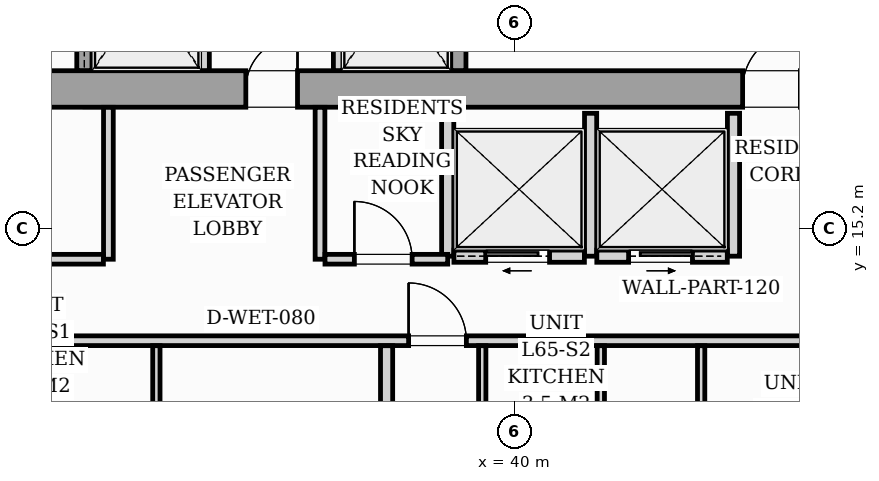
"""IFC4 building model, lengths in metres.
Left out: names, types, materials, properties, quantities, classifications, styles, units other than length and angle.
Written with IfcOpenShell. Run it as: python <this file> out.ifc"""

import sys

from ifc_helpers import new_model, si_unit, direction, frame, frame_2d, origin, origin_2d, place, context, subcontext, project, spatial, rectangle, i_section, extrude, source, transform, mapped, element, fill, save


model = new_model("IFC4")
c1 = context("Model", 3, precision=1e-05, world=origin(), true_north=direction((0.0, 1.0)))
c2 = subcontext(c1, "Body", "Model", "MODEL_VIEW")
j1 = project(units=[si_unit("LENGTHUNIT", "METRE"), si_unit("PLANEANGLEUNIT", "RADIAN")], contexts=[c1])
p1 = place(None, origin())
s1 = spatial("IfcSite", under=j1, at=p1, CompositionType="ELEMENT")
p2 = place(p1, origin())
s2 = spatial("IfcBuilding", under=s1, at=p2, CompositionType="ELEMENT")
p3 = place(p2, frame((0.0, 0.0, 226.5)))
s3 = spatial("IfcBuildingStorey", under=s2, at=p3, CompositionType="ELEMENT", Elevation=226.5)
m1 = source(origin(), c2, "Body", "SweptSolid", [
    extrude(i_section(OverallWidth=0.409, OverallDepth=0.425, WebThickness=0.033, FlangeThickness=0.052, FilletRadius=0.018, at=origin_2d()), origin(), (0.0, 0.0, 1.0), 3.296),
])
for number, where, z_axis, x_axis in (
    (1, (33.12, 17.4, 0.002), (0.0, 0.0, 1.0), (1.0, 0.0, 0.0)),
    (2, (38.88, 17.4, 0.002), (0.0, 0.0, 1.0), (1.0, 0.0, 0.0)),
):
    element("IfcColumn", number, at=place(p3, frame(where, z_axis=z_axis, x_axis=x_axis)), inside=s3, PredefinedType="PILASTER", context=c2, shape_type="MappedRepresentation", body=[
        mapped(m1, transform((0.0, 0.0, 0.0), scale=1.0)),
    ])
p4 = place(p3, frame((26.2, 17.5, 0.0), z_axis=(0.0, 0.0, 1.0), x_axis=(1.0, 0.0, 0.0)))
e3 = element("IfcWall", 3, at=p4, inside=s3, PredefinedType="SHEAR", context=c2, shape_type="SweptSolid", body=[
    extrude(rectangle(XDim=19.6, YDim=0.6, at=frame_2d((9.8, 0.0))), origin(), (0.0, 0.0, 1.0), 3.3),
])
p5 = place(p4, frame((0.95, 0.0, 0.0)))
e4 = element("IfcOpeningElement", 4, at=p5, cuts=e3, PredefinedType="OPENING", context=c2, shape_type="SweptSolid", body=[
    extrude(rectangle(XDim=0.95, YDim=2.06, at=frame_2d((0.475, 1.03))), frame((0.0, 0.31, 0.0), z_axis=(0.0, -1.0, 0.0), x_axis=(1.0, 0.0, 0.0)), (0.0, 0.0, 1.0), 0.62),
])
p6 = place(p4, frame((9.38, 0.0, 0.0)))
e5 = element("IfcOpeningElement", 5, at=p6, cuts=e3, PredefinedType="OPENING", context=c2, shape_type="SweptSolid", body=[
    extrude(rectangle(XDim=0.85, YDim=2.0, at=frame_2d((0.425, 1.0))), frame((0.0, 0.31, 0.0), z_axis=(0.0, -1.0, 0.0), x_axis=(1.0, 0.0, 0.0)), (0.0, 0.0, 1.0), 0.62),
])
p7 = place(p4, frame((17.55, 0.0, 0.0)))
e6 = element("IfcOpeningElement", 6, at=p7, cuts=e3, PredefinedType="OPENING", context=c2, shape_type="SweptSolid", body=[
    extrude(rectangle(XDim=0.95, YDim=2.06, at=frame_2d((0.475, 1.03))), frame((0.0, 0.31, 0.0), z_axis=(0.0, -1.0, 0.0), x_axis=(1.0, 0.0, 0.0)), (0.0, 0.0, 1.0), 0.62),
])
p8 = place(p3, frame((32.925, 17.802, 0.0), z_axis=(0.0, 0.0, 1.0), x_axis=(0.0, 1.0, 0.0)))
e7 = element("IfcWall", 7, at=p8, inside=s3, PredefinedType="SOLIDWALL", context=c2, shape_type="SweptSolid", body=[
    extrude(rectangle(XDim=2.646, YDim=0.25, at=frame_2d((1.323, 0.0))), origin(), (0.0, 0.0, 1.0), 3.3),
])
p9 = place(p8, frame((0.548, 0.0, 0.0)))
e8 = element("IfcOpeningElement", 8, at=p9, cuts=e7, PredefinedType="OPENING", context=c2, shape_type="SweptSolid", body=[
    extrude(rectangle(XDim=1.1, YDim=2.08, at=frame_2d((0.55, 1.04))), frame((0.0, 0.135, 0.0), z_axis=(0.0, -1.0, 0.0), x_axis=(1.0, 0.0, 0.0)), (0.0, 0.0, 1.0), 0.27),
])
for number, where, z_axis, x_axis in (
    (9, (34.9, 17.802, 0.0), (0.0, 0.0, 1.0), (0.0, 1.0, 0.0)),
    (10, (37.1, 17.802, 0.0), (0.0, 0.0, 1.0), (0.0, 1.0, 0.0)),
):
    element("IfcWall", number, at=place(p3, frame(where, z_axis=z_axis, x_axis=x_axis)), inside=s3, PredefinedType="PARTITIONING", context=c2, shape_type="SweptSolid", body=[
        extrude(rectangle(XDim=2.646, YDim=0.16, at=frame_2d((1.323, 0.0))), origin(), (0.0, 0.0, 1.0), 3.04),
    ])
p10 = place(p3, frame((39.075, 17.802, 0.0), z_axis=(0.0, 0.0, 1.0), x_axis=(0.0, 1.0, 0.0)))
e11 = element("IfcWall", 11, at=p10, inside=s3, PredefinedType="SOLIDWALL", context=c2, shape_type="SweptSolid", body=[
    extrude(rectangle(XDim=2.646, YDim=0.25, at=frame_2d((1.323, 0.0))), origin(), (0.0, 0.0, 1.0), 3.3),
])
p11 = place(p10, frame((0.548, 0.0, 0.0)))
e12 = element("IfcOpeningElement", 12, at=p11, cuts=e11, PredefinedType="OPENING", context=c2, shape_type="SweptSolid", body=[
    extrude(rectangle(XDim=1.1, YDim=2.08, at=frame_2d((0.55, 1.04))), frame((0.0, 0.135, 0.0), z_axis=(0.0, -1.0, 0.0), x_axis=(1.0, 0.0, 0.0)), (0.0, 0.0, 1.0), 0.27),
])
for number, where, z_axis, x_axis in (
    (13, (38.9, 14.75, 0.0), (0.0, 0.0, 1.0), (0.0, 1.0, 0.0)),
    (14, (41.25, 14.75, 0.0), (0.0, 0.0, 1.0), (0.0, 1.0, 0.0)),
    (15, (43.6, 14.75, 0.0), (0.0, 0.0, 1.0), (0.0, 1.0, 0.0)),
):
    element("IfcWall", number, at=place(p3, frame(where, z_axis=z_axis, x_axis=x_axis)), inside=s3, PredefinedType="PARTITIONING", context=c2, shape_type="SweptSolid", body=[
        extrude(rectangle(XDim=2.35, YDim=0.2, at=frame_2d((1.175, 0.0))), origin(), (0.0, 0.0, 1.0), 3.04),
    ])
p12 = place(p3, frame((39.002, 14.75, 0.0), z_axis=(0.0, 0.0, 1.0), x_axis=(1.0, 0.0, 0.0)))
e16 = element("IfcWall", 16, at=p12, inside=s3, PredefinedType="PARTITIONING", context=c2, shape_type="SweptSolid", body=[
    extrude(rectangle(XDim=2.146, YDim=0.2, at=frame_2d((1.073, 0.0))), origin(), (0.0, 0.0, 1.0), 3.04),
])
p13 = place(p12, frame((0.523, 0.0, 0.0)))
e17 = element("IfcOpeningElement", 17, at=p13, cuts=e16, PredefinedType="OPENING", context=c2, shape_type="SweptSolid", body=[
    extrude(rectangle(XDim=1.05, YDim=2.08, at=frame_2d((0.525, 1.04))), frame((0.0, 0.11, 0.0), z_axis=(0.0, -1.0, 0.0), x_axis=(1.0, 0.0, 0.0)), (0.0, 0.0, 1.0), 0.22),
])
p14 = place(p3, frame((41.352, 14.75, 0.0), z_axis=(0.0, 0.0, 1.0), x_axis=(1.0, 0.0, 0.0)))
e18 = element("IfcWall", 18, at=p14, inside=s3, PredefinedType="PARTITIONING", context=c2, shape_type="SweptSolid", body=[
    extrude(rectangle(XDim=2.146, YDim=0.2, at=frame_2d((1.073, 0.0))), origin(), (0.0, 0.0, 1.0), 3.04),
])
p15 = place(p14, frame((0.523, 0.0, 0.0)))
e19 = element("IfcOpeningElement", 19, at=p15, cuts=e18, PredefinedType="OPENING", context=c2, shape_type="SweptSolid", body=[
    extrude(rectangle(XDim=1.05, YDim=2.08, at=frame_2d((0.525, 1.04))), frame((0.0, 0.11, 0.0), z_axis=(0.0, -1.0, 0.0), x_axis=(1.0, 0.0, 0.0)), (0.0, 0.0, 1.0), 0.22),
])
p16 = place(p3, frame((24.55, 13.36, 0.0), z_axis=(0.0, 0.0, 1.0), x_axis=(1.0, 0.0, 0.0)))
e20 = element("IfcWall", 20, at=p16, inside=s3, PredefinedType="PARTITIONING", context=c2, shape_type="SweptSolid", body=[
    extrude(rectangle(XDim=21.33, YDim=0.16, at=frame_2d((10.665, 0.0))), origin(), (0.0, 0.0, 1.0), 2.605),
])
p17 = place(p16, frame((2.37, 0.0, 0.0)))
e21 = element("IfcOpeningElement", 21, at=p17, cuts=e20, PredefinedType="OPENING", context=c2, shape_type="SweptSolid", body=[
    extrude(rectangle(XDim=0.95, YDim=2.06, at=frame_2d((0.475, 1.03))), frame((0.0, 0.09, 0.0), z_axis=(0.0, -1.0, 0.0), x_axis=(1.0, 0.0, 0.0)), (0.0, 0.0, 1.0), 0.18),
])
p18 = place(p16, frame((13.707, 0.0, 0.0)))
e22 = element("IfcOpeningElement", 22, at=p18, cuts=e20, PredefinedType="OPENING", context=c2, shape_type="SweptSolid", body=[
    extrude(rectangle(XDim=0.95, YDim=2.06, at=frame_2d((0.475, 1.03))), frame((0.0, 0.09, 0.0), z_axis=(0.0, -1.0, 0.0), x_axis=(1.0, 0.0, 0.0)), (0.0, 0.0, 1.0), 0.18),
])
p19 = place(p3, frame((34.109, 9.024, 0.0), z_axis=(0.0, 0.0, 1.0), x_axis=(0.0, 1.0, 0.0)))
e23 = element("IfcWall", 23, at=p19, inside=s3, PredefinedType="PARTITIONING", context=c2, shape_type="SweptSolid", body=[
    extrude(rectangle(XDim=4.254, YDim=0.12, at=frame_2d((2.127, 0.0))), origin(), (0.0, 0.0, 1.0), 3.04),
])
p20 = place(p19, frame((2.395, 0.0, 0.0)))
e24 = element("IfcOpeningElement", 24, at=p20, cuts=e23, PredefinedType="OPENING", context=c2, shape_type="SweptSolid", body=[
    extrude(rectangle(XDim=0.9, YDim=2.05, at=frame_2d((0.45, 1.025))), frame((0.0, 0.07, 0.0), z_axis=(0.0, -1.0, 0.0), x_axis=(1.0, 0.0, 0.0)), (0.0, 0.0, 1.0), 0.14),
])
p21 = place(p3, frame((37.895, 8.68, 0.0), z_axis=(0.0, 0.0, 1.0), x_axis=(0.0, 1.0, 0.0)))
e25 = element("IfcWall", 25, at=p21, inside=s3, PredefinedType="PARTITIONING", context=c2, shape_type="SweptSolid", body=[
    extrude(rectangle(XDim=4.598, YDim=0.2, at=frame_2d((2.299, 0.0))), origin(), (0.0, 0.0, 1.0), 3.04),
])
p22 = place(p3, frame((43.068, 8.392, 0.0), z_axis=(0.0, 0.0, 1.0), x_axis=(0.0, 1.0, 0.0)))
e26 = element("IfcWall", 26, at=p22, inside=s3, PredefinedType="PARTITIONING", context=c2, shape_type="SweptSolid", body=[
    extrude(rectangle(XDim=4.886, YDim=0.12, at=frame_2d((2.443, 0.0))), origin(), (0.0, 0.0, 1.0), 3.04),
])
p23 = place(p22, frame((1.94, 0.0, 0.0)))
e27 = element("IfcOpeningElement", 27, at=p23, cuts=e26, PredefinedType="OPENING", context=c2, shape_type="SweptSolid", body=[
    extrude(rectangle(XDim=0.85, YDim=2.05, at=frame_2d((0.425, 1.025))), frame((0.0, 0.07, 0.0), z_axis=(0.0, -1.0, 0.0), x_axis=(1.0, 0.0, 0.0)), (0.0, 0.0, 1.0), 0.14),
])
for number, where, z_axis, x_axis in (
    (28, (39.468, 11.372, 0.0), (0.0, 0.0, 1.0), (0.0, 1.0, 0.0)),
    (29, (41.418, 11.372, 0.0), (0.0, 0.0, 1.0), (0.0, 1.0, 0.0)),
):
    element("IfcWall", number, at=place(p3, frame(where, z_axis=z_axis, x_axis=x_axis)), inside=s3, PredefinedType="PARTITIONING", context=c2, shape_type="SweptSolid", body=[
        extrude(rectangle(XDim=1.906, YDim=0.12, at=frame_2d((0.953, 0.0))), origin(), (0.0, 0.0, 1.0), 3.04),
    ])
p24 = place(p3, frame((33.32, 14.7, 0.0), z_axis=(0.0, 0.0, 1.0), x_axis=(0.0, 1.0, 0.0)))
e30 = element("IfcWall", 30, at=p24, inside=s3, PredefinedType="PARTITIONING", context=c2, shape_type="SweptSolid", body=[
    extrude(rectangle(XDim=2.498, YDim=0.16, at=frame_2d((1.249, 0.0))), origin(), (0.0, 0.0, 1.0), 3.04),
])
p25 = place(p3, frame((28.442, 14.7, 0.0), z_axis=(0.0, 0.0, 1.0), x_axis=(1.0, 0.0, 0.0)))
e31 = element("IfcWall", 31, at=p25, inside=s3, PredefinedType="PARTITIONING", context=c2, shape_type="SweptSolid", body=[
    extrude(rectangle(XDim=4.796, YDim=0.16, at=frame_2d((2.398, 0.0))), origin(), (0.0, 0.0, 1.0), 2.605),
])
p26 = place(p25, frame((1.923, 0.0, 0.0)))
e32 = element("IfcOpeningElement", 32, at=p26, cuts=e31, PredefinedType="OPENING", context=c2, shape_type="SweptSolid", body=[
    extrude(rectangle(XDim=0.95, YDim=2.06, at=frame_2d((0.475, 1.03))), frame((0.0, 0.09, 0.0), z_axis=(0.0, -1.0, 0.0), x_axis=(1.0, 0.0, 0.0)), (0.0, 0.0, 1.0), 0.18),
])
p27 = place(p3, frame((36.8, 14.7, 0.0), z_axis=(0.0, 0.0, 1.0), x_axis=(0.0, 1.0, 0.0)))
e33 = element("IfcWall", 33, at=p27, inside=s3, PredefinedType="PARTITIONING", context=c2, shape_type="SweptSolid", body=[
    extrude(rectangle(XDim=2.498, YDim=0.16, at=frame_2d((1.249, 0.0))), origin(), (0.0, 0.0, 1.0), 3.04),
])
p28 = place(p3, frame((36.882, 14.7, 0.0), z_axis=(0.0, 0.0, 1.0), x_axis=(1.0, 0.0, 0.0)))
e34 = element("IfcWall", 34, at=p28, inside=s3, PredefinedType="PARTITIONING", context=c2, shape_type="SweptSolid", body=[
    extrude(rectangle(XDim=2.018, YDim=0.16, at=frame_2d((1.009, 0.0))), origin(), (0.0, 0.0, 1.0), 3.04),
])
p29 = place(p28, frame((0.483, 0.0, 0.0)))
e35 = element("IfcOpeningElement", 35, at=p29, cuts=e34, PredefinedType="OPENING", context=c2, shape_type="SweptSolid", body=[
    extrude(rectangle(XDim=0.95, YDim=2.06, at=frame_2d((0.475, 1.03))), frame((0.0, 0.09, 0.0), z_axis=(0.0, -1.0, 0.0), x_axis=(1.0, 0.0, 0.0)), (0.0, 0.0, 1.0), 0.18),
])
m2 = source(origin(), c2, "Body", "SweptSolid", [
    extrude(rectangle(XDim=0.85, YDim=2.0, at=frame_2d((0.425, 1.0))), frame((0.0, 0.025, 0.0), z_axis=(0.0, -1.0, 0.0), x_axis=(1.0, 0.0, 0.0)), (0.0, 0.0, 1.0), 0.05),
])
p30 = place(p6, origin())
e36 = element("IfcDoor", 36, at=p30, inside=s3, OperationType="SINGLE_SWING_RIGHT", PredefinedType="DOOR", context=c2, shape_type="MappedRepresentation", body=[
    mapped(m2, transform((0.0, 0.0, 0.0), scale=1.0)),
])
fill(e5, e36)
m3 = source(origin(), c2, "Body", "SweptSolid", [
    extrude(rectangle(XDim=0.95, YDim=2.06, at=frame_2d((0.475, 1.03))), frame((0.0, 0.025, 0.0), z_axis=(0.0, -1.0, 0.0), x_axis=(1.0, 0.0, 0.0)), (0.0, 0.0, 1.0), 0.05),
])
p31 = place(p7, origin())
e37 = element("IfcDoor", 37, at=p31, inside=s3, OperationType="SINGLE_SWING_RIGHT", PredefinedType="DOOR", context=c2, shape_type="MappedRepresentation", body=[
    mapped(m3, transform((0.0, 0.0, 0.0), scale=1.0)),
])
fill(e6, e37)
m4 = source(origin(), c2, "Body", "SweptSolid", [
    extrude(rectangle(XDim=1.05, YDim=2.08, at=frame_2d((0.525, 1.04))), frame((0.0, 0.025, 0.0), z_axis=(0.0, -1.0, 0.0), x_axis=(1.0, 0.0, 0.0)), (0.0, 0.0, 1.0), 0.05),
])
p32 = place(p13, origin())
e38 = element("IfcDoor", 38, at=p32, inside=s3, OperationType="SLIDING_TO_LEFT", PredefinedType="DOOR", context=c2, shape_type="MappedRepresentation", body=[
    mapped(m4, transform((0.0, 0.0, 0.0), scale=1.0)),
])
fill(e17, e38)
p33 = place(p15, origin())
e39 = element("IfcDoor", 39, at=p33, inside=s3, OperationType="SLIDING_TO_RIGHT", PredefinedType="DOOR", context=c2, shape_type="MappedRepresentation", body=[
    mapped(m4, transform((0.0, 0.0, 0.0), scale=1.0)),
])
fill(e19, e39)
m5 = source(origin(), c2, "Body", "SweptSolid", [
    extrude(rectangle(XDim=0.95, YDim=2.06, at=frame_2d((0.475, 1.03))), frame((0.0, 0.025, 0.0), z_axis=(0.0, -1.0, 0.0), x_axis=(1.0, 0.0, 0.0)), (0.0, 0.0, 1.0), 0.05),
])
p34 = place(p18, origin())
e40 = element("IfcDoor", 40, at=p34, inside=s3, OperationType="SINGLE_SWING_LEFT", PredefinedType="DOOR", context=c2, shape_type="MappedRepresentation", body=[
    mapped(m5, transform((0.0, 0.0, 0.0), scale=1.0)),
])
fill(e22, e40)
p35 = place(p29, origin())
e41 = element("IfcDoor", 41, at=p35, inside=s3, OperationType="SINGLE_SWING_LEFT", PredefinedType="DOOR", context=c2, shape_type="MappedRepresentation", body=[
    mapped(m5, transform((0.0, 0.0, 0.0), scale=1.0)),
])
fill(e35, e41)
save(model, sys.argv[1])
